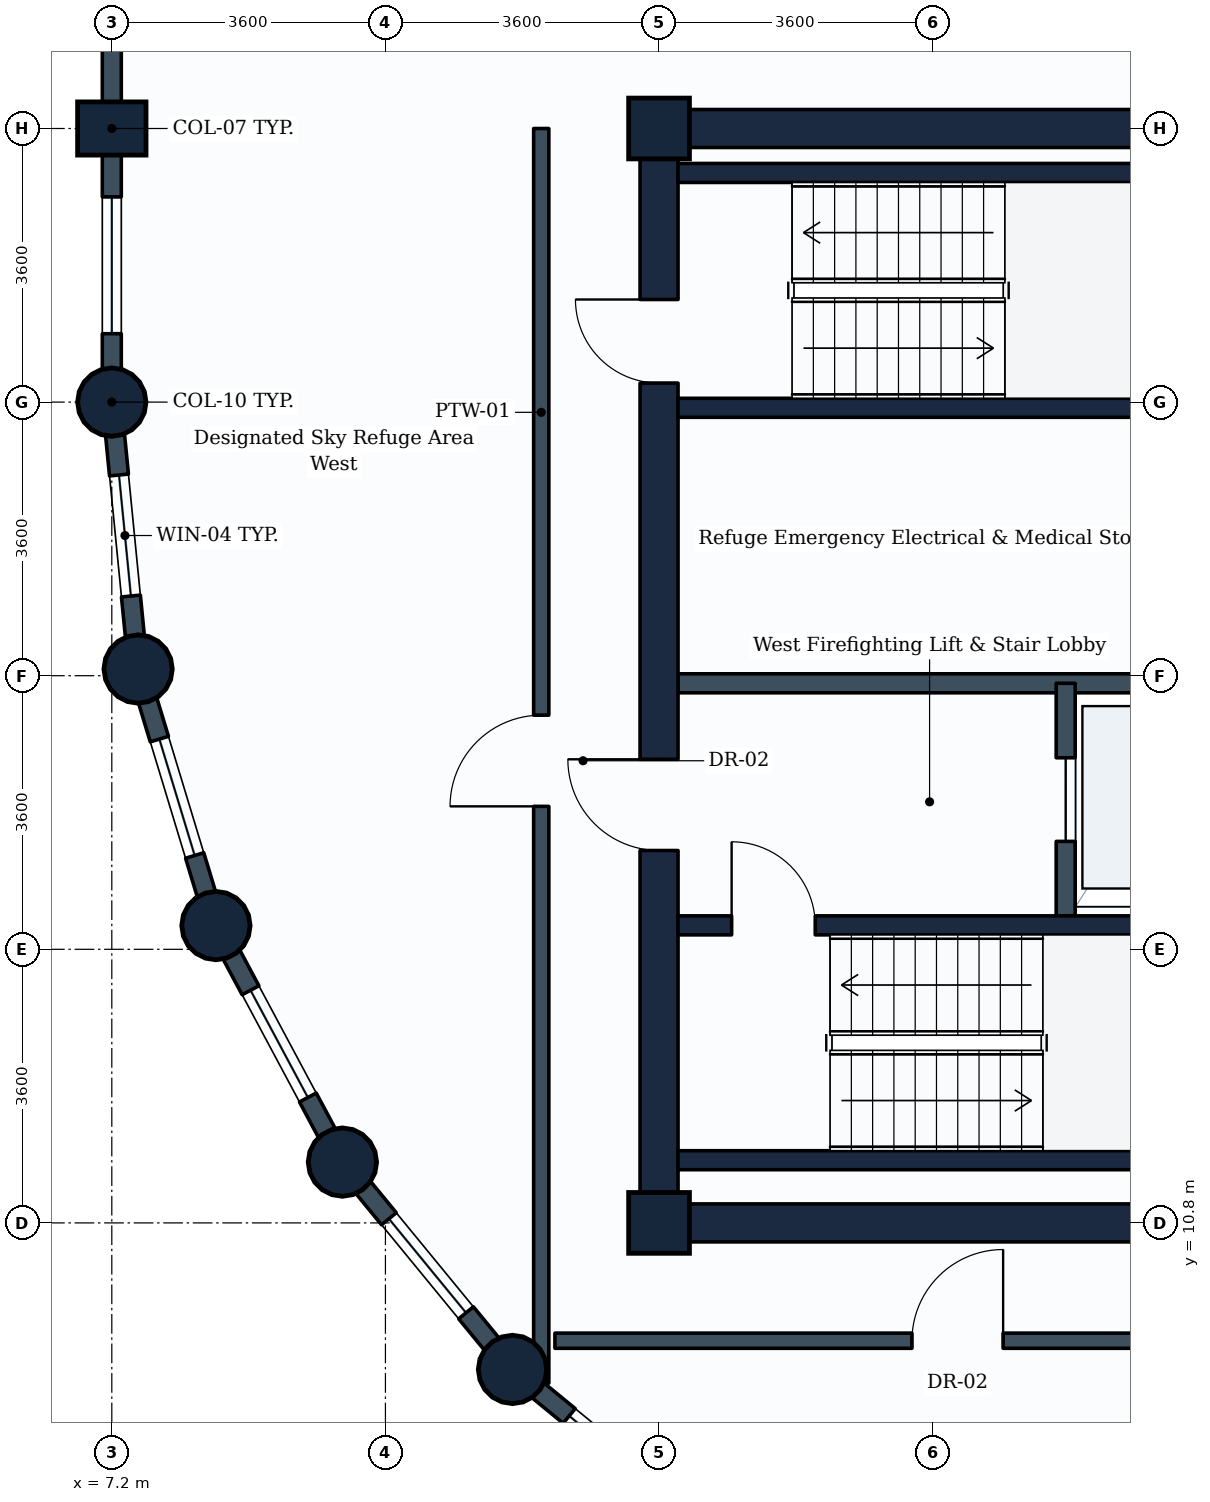
"""IFC4 building model, lengths in metres.
Left out: names, types, materials, properties, quantities, classifications, styles, units other than length and angle.
Written with IfcOpenShell. Run it as: python <this file> out.ifc"""

import sys

from ifc_helpers import new_model, si_unit, direction, frame, frame_2d, origin, origin_2d, place, context, subcontext, project, spatial, rectangle, circle, extrude, element, fill, save


model = new_model("IFC4")
c1 = context("Model", 3, precision=1e-05, world=origin(), true_north=direction((0.0, 1.0)))
c2 = subcontext(c1, "Body", "Model", "MODEL_VIEW")
j1 = project(units=[si_unit("LENGTHUNIT", "METRE"), si_unit("PLANEANGLEUNIT", "RADIAN")], contexts=[c1])
p1 = place(None, origin())
s1 = spatial("IfcSite", under=j1, at=p1, CompositionType="ELEMENT")
p2 = place(p1, origin())
s2 = spatial("IfcBuilding", under=s1, at=p2, CompositionType="ELEMENT")
p3 = place(p2, frame((0.0, 0.0, 213.8)))
s3 = spatial("IfcBuildingStorey", under=s2, at=p3, CompositionType="ELEMENT", Elevation=213.8)
p4 = place(p3, frame((7.2, 21.6, 0.0), z_axis=(0.0, 0.0, 1.0), x_axis=(1.0, 0.0, 0.0)))
e1 = element("IfcColumn", 1, at=p4, inside=s3, PredefinedType="COLUMN", context=c2, shape_type="SweptSolid", body=[
    extrude(circle(Radius=0.45, at=origin_2d()), origin(), (0.0, 0.0, 1.0), 3.6),
])
p5 = place(p3, frame((7.2, 25.2, 0.0), z_axis=(0.0, 0.0, 1.0), x_axis=(0.0, 1.0, 0.0)))
e2 = element("IfcColumn", 2, at=p5, inside=s3, PredefinedType="COLUMN", context=c2, shape_type="SweptSolid", body=[
    extrude(rectangle(XDim=0.7, YDim=0.9, at=origin_2d()), origin(), (0.0, 0.0, 1.0), 3.6),
])
for number, where, z_axis, x_axis in (
    (3, (7.546, 18.088, 0.0), (0.0, 0.0, 1.0), (1.0, 0.0, 0.0)),
    (4, (8.57, 14.712, 0.0), (0.0, 0.0, 1.0), (1.0, 0.0, 0.0)),
    (5, (10.234, 11.6, 0.0), (0.0, 0.0, 1.0), (1.0, 0.0, 0.0)),
    (6, (12.472, 8.872, 0.0), (0.0, 0.0, 1.0), (1.0, 0.0, 0.0)),
):
    element("IfcColumn", number, at=place(p3, frame(where, z_axis=z_axis, x_axis=x_axis)), inside=s3, PredefinedType="COLUMN", context=c2, shape_type="SweptSolid", body=[
        extrude(circle(Radius=0.45, at=origin_2d()), origin(), (0.0, 0.0, 1.0), 3.6),
    ])
for number, where, z_axis, x_axis in (
    (7, (14.4, 10.8, 0.0), (0.0, 0.0, 1.0), (1.0, 0.0, 0.0)),
    (8, (14.4, 25.2, 0.0), (0.0, 0.0, 1.0), (1.0, 0.0, 0.0)),
):
    element("IfcColumn", number, at=place(p3, frame(where, z_axis=z_axis, x_axis=x_axis)), inside=s3, PredefinedType="COLUMN", context=c2, shape_type="SweptSolid", body=[
        extrude(rectangle(XDim=0.8, YDim=0.8, at=origin_2d()), origin(), (0.0, 0.0, 1.0), 3.6),
    ])
p6 = place(p3, frame((7.2, 25.2, 0.0), z_axis=(0.0, 0.0, 1.0), x_axis=(0.0, 1.0, 0.0)))
e9 = element("IfcWall", 9, at=p6, inside=s3, PredefinedType="STANDARD", context=c2, shape_type="SweptSolid", body=[
    extrude(rectangle(XDim=3.6, YDim=0.25, at=frame_2d((1.8, 0.0))), origin(), (0.0, 0.0, 1.0), 2.73),
])
p7 = place(p3, frame((7.2, 21.6, 0.0), z_axis=(0.0, 0.0, 1.0), x_axis=(0.0, 1.0, 0.0)))
e10 = element("IfcWall", 10, at=p7, inside=s3, PredefinedType="STANDARD", context=c2, shape_type="SweptSolid", body=[
    extrude(rectangle(XDim=3.6, YDim=0.25, at=frame_2d((1.8, 0.0))), origin(), (0.0, 0.0, 1.0), 2.73),
])
p8 = place(p7, frame((0.9, 0.0, 0.85)))
e11 = element("IfcOpeningElement", 11, at=p8, cuts=e10, PredefinedType="OPENING", context=c2, shape_type="SweptSolid", body=[
    extrude(rectangle(XDim=1.8, YDim=1.35, at=frame_2d((0.9, 0.675))), frame((0.0, 0.135, 0.0), z_axis=(0.0, -1.0, 0.0), x_axis=(1.0, 0.0, 0.0)), (0.0, 0.0, 1.0), 0.27),
])
p9 = place(p3, frame((7.546, 18.088, 0.0), z_axis=(0.0, 0.0, 1.0), x_axis=(-0.09802417461, 0.995184033831, 0.0)))
e12 = element("IfcWall", 12, at=p9, inside=s3, PredefinedType="STANDARD", context=c2, shape_type="SweptSolid", body=[
    extrude(rectangle(XDim=3.529, YDim=0.25, at=frame_2d((1.765, 0.0))), origin(), (0.0, 0.0, 1.0), 2.73),
])
p10 = place(p9, frame((0.965, 0.0, 0.85)))
e13 = element("IfcOpeningElement", 13, at=p10, cuts=e12, PredefinedType="OPENING", context=c2, shape_type="SweptSolid", body=[
    extrude(rectangle(XDim=1.6, YDim=1.35, at=frame_2d((0.8, 0.675))), frame((0.0, 0.135, 0.0), z_axis=(0.0, -1.0, 0.0), x_axis=(1.0, 0.0, 0.0)), (0.0, 0.0, 1.0), 0.27),
])
p11 = place(p3, frame((8.57, 14.712, 0.0), z_axis=(0.0, 0.0, 1.0), x_axis=(-0.290305086481, 0.956934144423, 0.0)))
e14 = element("IfcWall", 14, at=p11, inside=s3, PredefinedType="STANDARD", context=c2, shape_type="SweptSolid", body=[
    extrude(rectangle(XDim=3.528, YDim=0.25, at=frame_2d((1.764, 0.0))), origin(), (0.0, 0.0, 1.0), 2.73),
])
p12 = place(p11, frame((0.964, 0.0, 0.85)))
e15 = element("IfcOpeningElement", 15, at=p12, cuts=e14, PredefinedType="OPENING", context=c2, shape_type="SweptSolid", body=[
    extrude(rectangle(XDim=1.6, YDim=1.35, at=frame_2d((0.8, 0.675))), frame((0.0, 0.135, 0.0), z_axis=(0.0, -1.0, 0.0), x_axis=(1.0, 0.0, 0.0)), (0.0, 0.0, 1.0), 0.27),
])
p13 = place(p3, frame((10.234, 11.6, 0.0), z_axis=(0.0, 0.0, 1.0), x_axis=(-0.47151087309, 0.881860247748, 0.0)))
e16 = element("IfcWall", 16, at=p13, inside=s3, PredefinedType="STANDARD", context=c2, shape_type="SweptSolid", body=[
    extrude(rectangle(XDim=3.529, YDim=0.25, at=frame_2d((1.764, 0.0))), origin(), (0.0, 0.0, 1.0), 2.73),
])
p14 = place(p13, frame((0.964, 0.0, 0.85)))
e17 = element("IfcOpeningElement", 17, at=p14, cuts=e16, PredefinedType="OPENING", context=c2, shape_type="SweptSolid", body=[
    extrude(rectangle(XDim=1.6, YDim=1.35, at=frame_2d((0.8, 0.675))), frame((0.0, 0.135, 0.0), z_axis=(0.0, -1.0, 0.0), x_axis=(1.0, 0.0, 0.0)), (0.0, 0.0, 1.0), 0.27),
])
p15 = place(p3, frame((12.472, 8.872, 0.0), z_axis=(0.0, 0.0, 1.0), x_axis=(-0.634258295121, 0.773121216285, 0.0)))
e18 = element("IfcWall", 18, at=p15, inside=s3, PredefinedType="STANDARD", context=c2, shape_type="SweptSolid", body=[
    extrude(rectangle(XDim=3.529, YDim=0.25, at=frame_2d((1.764, 0.0))), origin(), (0.0, 0.0, 1.0), 2.73),
])
p16 = place(p15, frame((0.964, 0.0, 0.85)))
e19 = element("IfcOpeningElement", 19, at=p16, cuts=e18, PredefinedType="OPENING", context=c2, shape_type="SweptSolid", body=[
    extrude(rectangle(XDim=1.6, YDim=1.35, at=frame_2d((0.8, 0.675))), frame((0.0, 0.135, 0.0), z_axis=(0.0, -1.0, 0.0), x_axis=(1.0, 0.0, 0.0)), (0.0, 0.0, 1.0), 0.27),
])
p17 = place(p3, frame((15.2, 6.634, 0.0), z_axis=(0.0, 0.0, 1.0), x_axis=(-0.773121216285, 0.634258295121, 0.0)))
e20 = element("IfcWall", 20, at=p17, inside=s3, PredefinedType="STANDARD", context=c2, shape_type="SweptSolid", body=[
    extrude(rectangle(XDim=3.529, YDim=0.25, at=frame_2d((1.764, 0.0))), origin(), (0.0, 0.0, 1.0), 2.73),
])
p18 = place(p17, frame((0.964, 0.0, 0.85)))
e21 = element("IfcOpeningElement", 21, at=p18, cuts=e20, PredefinedType="OPENING", context=c2, shape_type="SweptSolid", body=[
    extrude(rectangle(XDim=1.6, YDim=1.35, at=frame_2d((0.8, 0.675))), frame((0.0, 0.135, 0.0), z_axis=(0.0, -1.0, 0.0), x_axis=(1.0, 0.0, 0.0)), (0.0, 0.0, 1.0), 0.27),
])
p19 = place(p3, frame((14.4, 10.8, 0.0), z_axis=(0.0, 0.0, 1.0), x_axis=(1.0, 0.0, 0.0)))
e22 = element("IfcWall", 22, at=p19, inside=s3, PredefinedType="SHEAR", context=c2, shape_type="SweptSolid", body=[
    extrude(rectangle(XDim=18.0, YDim=0.5, at=frame_2d((9.0, 0.0))), origin(), (0.0, 0.0, 1.0), 3.35),
])
p20 = place(p3, frame((14.4, 25.2, 0.0), z_axis=(0.0, 0.0, 1.0), x_axis=(1.0, 0.0, 0.0)))
e23 = element("IfcWall", 23, at=p20, inside=s3, PredefinedType="SHEAR", context=c2, shape_type="SweptSolid", body=[
    extrude(rectangle(XDim=10.8, YDim=0.5, at=frame_2d((5.4, 0.0))), origin(), (0.0, 0.0, 1.0), 3.35),
])
p21 = place(p3, frame((14.4, 10.8, 0.0), z_axis=(0.0, 0.0, 1.0), x_axis=(0.0, 1.0, 0.0)))
e24 = element("IfcWall", 24, at=p21, inside=s3, PredefinedType="SHEAR", context=c2, shape_type="SweptSolid", body=[
    extrude(rectangle(XDim=14.4, YDim=0.5, at=frame_2d((7.2, 0.0))), origin(), (0.0, 0.0, 1.0), 3.35),
])
p22 = place(p21, frame((11.05, 0.0, 0.0)))
e25 = element("IfcOpeningElement", 25, at=p22, cuts=e24, PredefinedType="OPENING", context=c2, shape_type="SweptSolid", body=[
    extrude(rectangle(XDim=1.1, YDim=2.1, at=frame_2d((0.55, 1.05))), frame((0.0, 0.26, 0.0), z_axis=(0.0, -1.0, 0.0), x_axis=(1.0, 0.0, 0.0)), (0.0, 0.0, 1.0), 0.52),
])
p23 = place(p21, frame((4.9, 0.0, 0.0)))
e26 = element("IfcOpeningElement", 26, at=p23, cuts=e24, PredefinedType="OPENING", context=c2, shape_type="SweptSolid", body=[
    extrude(rectangle(XDim=1.2, YDim=2.1, at=frame_2d((0.6, 1.05))), frame((0.0, 0.26, 0.0), z_axis=(0.0, -1.0, 0.0), x_axis=(1.0, 0.0, 0.0)), (0.0, 0.0, 1.0), 0.52),
])
p24 = place(p3, frame((14.65, 11.625, 0.0), z_axis=(0.0, 0.0, 1.0), x_axis=(1.0, 0.0, 0.0)))
e27 = element("IfcWall", 27, at=p24, inside=s3, PredefinedType="SHEAR", context=c2, shape_type="SweptSolid", body=[
    extrude(rectangle(XDim=8.7, YDim=0.25, at=frame_2d((4.35, 0.0))), origin(), (0.0, 0.0, 1.0), 3.35),
])
p25 = place(p3, frame((14.65, 14.715, 0.0), z_axis=(0.0, 0.0, 1.0), x_axis=(1.0, 0.0, 0.0)))
e28 = element("IfcWall", 28, at=p25, inside=s3, PredefinedType="SHEAR", context=c2, shape_type="SweptSolid", body=[
    extrude(rectangle(XDim=8.7, YDim=0.25, at=frame_2d((4.35, 0.0))), origin(), (0.0, 0.0, 1.0), 3.35),
])
p26 = place(p25, frame((0.705, 0.0, 0.0)))
e29 = element("IfcOpeningElement", 29, at=p26, cuts=e28, PredefinedType="OPENING", context=c2, shape_type="SweptSolid", body=[
    extrude(rectangle(XDim=1.1, YDim=2.1, at=frame_2d((0.55, 1.05))), frame((0.0, 0.135, 0.0), z_axis=(0.0, -1.0, 0.0), x_axis=(1.0, 0.0, 0.0)), (0.0, 0.0, 1.0), 0.27),
])
for number, where, z_axis, x_axis in (
    (30, (14.65, 21.525, 0.0), (0.0, 0.0, 1.0), (1.0, 0.0, 0.0)),
    (31, (14.65, 24.615, 0.0), (0.0, 0.0, 1.0), (1.0, 0.0, 0.0)),
):
    element("IfcWall", number, at=place(p3, frame(where, z_axis=z_axis, x_axis=x_axis)), inside=s3, PredefinedType="SHEAR", context=c2, shape_type="SweptSolid", body=[
        extrude(rectangle(XDim=8.25, YDim=0.25, at=frame_2d((4.125, 0.0))), origin(), (0.0, 0.0, 1.0), 3.35),
    ])
p27 = place(p3, frame((14.65, 17.9, 0.0), z_axis=(0.0, 0.0, 1.0), x_axis=(1.0, 0.0, 0.0)))
e32 = element("IfcWall", 32, at=p27, inside=s3, PredefinedType="PARTITIONING", context=c2, shape_type="SweptSolid", body=[
    extrude(rectangle(XDim=7.15, YDim=0.25, at=frame_2d((3.575, 0.0))), origin(), (0.0, 0.0, 1.0), 3.335),
])
p28 = place(p3, frame((19.75, 14.84, 0.0), z_axis=(0.0, 0.0, 1.0), x_axis=(0.0, 1.0, 0.0)))
e33 = element("IfcWall", 33, at=p28, inside=s3, PredefinedType="PARTITIONING", context=c2, shape_type="SweptSolid", body=[
    extrude(rectangle(XDim=3.06, YDim=0.25, at=frame_2d((1.53, 0.0))), origin(), (0.0, 0.0, 1.0), 3.335),
])
p29 = place(p28, frame((0.98, 0.0, 0.0)))
e34 = element("IfcOpeningElement", 34, at=p29, cuts=e33, PredefinedType="OPENING", context=c2, shape_type="SweptSolid", body=[
    extrude(rectangle(XDim=1.1, YDim=2.1, at=frame_2d((0.55, 1.05))), frame((0.0, 0.135, 0.0), z_axis=(0.0, -1.0, 0.0), x_axis=(1.0, 0.0, 0.0)), (0.0, 0.0, 1.0), 0.27),
])
p30 = place(p3, frame((12.85, 8.691, 0.0), z_axis=(0.0, 0.0, 1.0), x_axis=(0.0, 1.0, 0.0)))
e35 = element("IfcWall", 35, at=p30, inside=s3, PredefinedType="PARTITIONING", context=c2, shape_type="SweptSolid", body=[
    extrude(rectangle(XDim=16.509, YDim=0.2, at=frame_2d((8.254, 0.0))), origin(), (0.0, 0.0, 1.0), 2.73),
])
p31 = place(p30, frame((7.59, 0.0, 0.0)))
e36 = element("IfcOpeningElement", 36, at=p31, cuts=e35, PredefinedType="OPENING", context=c2, shape_type="SweptSolid", body=[
    extrude(rectangle(XDim=1.2, YDim=2.1, at=frame_2d((0.6, 1.05))), frame((0.0, 0.11, 0.0), z_axis=(0.0, -1.0, 0.0), x_axis=(1.0, 0.0, 0.0)), (0.0, 0.0, 1.0), 0.22),
])
p32 = place(p3, frame((13.03, 9.25, 0.0), z_axis=(0.0, 0.0, 1.0), x_axis=(1.0, 0.0, 0.0)))
e37 = element("IfcWall", 37, at=p32, inside=s3, PredefinedType="PARTITIONING", context=c2, shape_type="SweptSolid", body=[
    extrude(rectangle(XDim=15.77, YDim=0.2, at=frame_2d((7.885, 0.0))), origin(), (0.0, 0.0, 1.0), 3.02),
])
p33 = place(p32, frame((4.697, 0.0, 0.0)))
e38 = element("IfcOpeningElement", 38, at=p33, cuts=e37, PredefinedType="OPENING", context=c2, shape_type="SweptSolid", body=[
    extrude(rectangle(XDim=1.2, YDim=2.1, at=frame_2d((0.6, 1.05))), frame((0.0, 0.11, 0.0), z_axis=(0.0, -1.0, 0.0), x_axis=(1.0, 0.0, 0.0)), (0.0, 0.0, 1.0), 0.22),
])
p34 = place(p8, origin())
e39 = element("IfcWindow", 39, at=p34, inside=s3, PartitioningType="SINGLE_PANEL", PredefinedType="WINDOW", context=c2, shape_type="SweptSolid", body=[
    extrude(rectangle(XDim=1.8, YDim=1.35, at=frame_2d((0.9, 0.675))), frame((0.0, 0.03, 0.0), z_axis=(0.0, -1.0, 0.0), x_axis=(1.0, 0.0, 0.0)), (0.0, 0.0, 1.0), 0.06),
])
fill(e11, e39)
p35 = place(p10, origin())
e40 = element("IfcWindow", 40, at=p35, inside=s3, PartitioningType="SINGLE_PANEL", PredefinedType="WINDOW", context=c2, shape_type="SweptSolid", body=[
    extrude(rectangle(XDim=1.6, YDim=1.35, at=frame_2d((0.8, 0.675))), frame((0.0, 0.03, 0.0), z_axis=(0.0, -1.0, 0.0), x_axis=(1.0, 0.0, 0.0)), (0.0, 0.0, 1.0), 0.06),
])
fill(e13, e40)
p36 = place(p12, origin())
e41 = element("IfcWindow", 41, at=p36, inside=s3, PartitioningType="SINGLE_PANEL", PredefinedType="WINDOW", context=c2, shape_type="SweptSolid", body=[
    extrude(rectangle(XDim=1.6, YDim=1.35, at=frame_2d((0.8, 0.675))), frame((0.0, 0.03, 0.0), z_axis=(0.0, -1.0, 0.0), x_axis=(1.0, 0.0, 0.0)), (0.0, 0.0, 1.0), 0.06),
])
fill(e15, e41)
p37 = place(p14, origin())
e42 = element("IfcWindow", 42, at=p37, inside=s3, PartitioningType="SINGLE_PANEL", PredefinedType="WINDOW", context=c2, shape_type="SweptSolid", body=[
    extrude(rectangle(XDim=1.6, YDim=1.35, at=frame_2d((0.8, 0.675))), frame((0.0, 0.03, 0.0), z_axis=(0.0, -1.0, 0.0), x_axis=(1.0, 0.0, 0.0)), (0.0, 0.0, 1.0), 0.06),
])
fill(e17, e42)
p38 = place(p16, origin())
e43 = element("IfcWindow", 43, at=p38, inside=s3, PartitioningType="SINGLE_PANEL", PredefinedType="WINDOW", context=c2, shape_type="SweptSolid", body=[
    extrude(rectangle(XDim=1.6, YDim=1.35, at=frame_2d((0.8, 0.675))), frame((0.0, 0.03, 0.0), z_axis=(0.0, -1.0, 0.0), x_axis=(1.0, 0.0, 0.0)), (0.0, 0.0, 1.0), 0.06),
])
fill(e19, e43)
p39 = place(p18, origin())
e44 = element("IfcWindow", 44, at=p39, inside=s3, PartitioningType="SINGLE_PANEL", PredefinedType="WINDOW", context=c2, shape_type="SweptSolid", body=[
    extrude(rectangle(XDim=1.6, YDim=1.35, at=frame_2d((0.8, 0.675))), frame((0.0, 0.03, 0.0), z_axis=(0.0, -1.0, 0.0), x_axis=(1.0, 0.0, 0.0)), (0.0, 0.0, 1.0), 0.06),
])
fill(e21, e44)
p40 = place(p26, origin())
e45 = element("IfcDoor", 45, at=p40, inside=s3, OperationType="SINGLE_SWING_LEFT", PredefinedType="DOOR", context=c2, shape_type="SweptSolid", body=[
    extrude(rectangle(XDim=1.1, YDim=2.1, at=frame_2d((0.55, 1.05))), frame((0.0, 0.025, 0.0), z_axis=(0.0, -1.0, 0.0), x_axis=(1.0, 0.0, 0.0)), (0.0, 0.0, 1.0), 0.05),
])
fill(e29, e45)
p41 = place(p22, origin())
e46 = element("IfcDoor", 46, at=p41, inside=s3, OperationType="SINGLE_SWING_RIGHT", PredefinedType="DOOR", context=c2, shape_type="SweptSolid", body=[
    extrude(rectangle(XDim=1.1, YDim=2.1, at=frame_2d((0.55, 1.05))), frame((0.0, 0.025, 0.0), z_axis=(0.0, -1.0, 0.0), x_axis=(1.0, 0.0, 0.0)), (0.0, 0.0, 1.0), 0.05),
])
fill(e25, e46)
p42 = place(p29, origin())
e47 = element("IfcDoor", 47, at=p42, inside=s3, OperationType="SLIDING_TO_LEFT", PredefinedType="DOOR", context=c2, shape_type="SweptSolid", body=[
    extrude(rectangle(XDim=1.1, YDim=2.1, at=frame_2d((0.55, 1.05))), frame((0.0, 0.025, 0.0), z_axis=(0.0, -1.0, 0.0), x_axis=(1.0, 0.0, 0.0)), (0.0, 0.0, 1.0), 0.05),
])
fill(e34, e47)
p43 = place(p23, origin())
e48 = element("IfcDoor", 48, at=p43, inside=s3, OperationType="SINGLE_SWING_RIGHT", PredefinedType="DOOR", context=c2, shape_type="SweptSolid", body=[
    extrude(rectangle(XDim=1.2, YDim=2.1, at=frame_2d((0.6, 1.05))), frame((0.0, 0.025, 0.0), z_axis=(0.0, -1.0, 0.0), x_axis=(1.0, 0.0, 0.0)), (0.0, 0.0, 1.0), 0.05),
])
fill(e26, e48)
p44 = place(p31, origin())
e49 = element("IfcDoor", 49, at=p44, inside=s3, OperationType="SINGLE_SWING_LEFT", PredefinedType="DOOR", context=c2, shape_type="SweptSolid", body=[
    extrude(rectangle(XDim=1.2, YDim=2.1, at=frame_2d((0.6, 1.05))), frame((0.0, 0.025, 0.0), z_axis=(0.0, -1.0, 0.0), x_axis=(1.0, 0.0, 0.0)), (0.0, 0.0, 1.0), 0.05),
])
fill(e36, e49)
p45 = place(p33, origin())
e50 = element("IfcDoor", 50, at=p45, inside=s3, OperationType="SINGLE_SWING_RIGHT", PredefinedType="DOOR", context=c2, shape_type="SweptSolid", body=[
    extrude(rectangle(XDim=1.2, YDim=2.1, at=frame_2d((0.6, 1.05))), frame((0.0, 0.025, 0.0), z_axis=(0.0, -1.0, 0.0), x_axis=(1.0, 0.0, 0.0)), (0.0, 0.0, 1.0), 0.05),
])
fill(e38, e50)
save(model, sys.argv[1])
